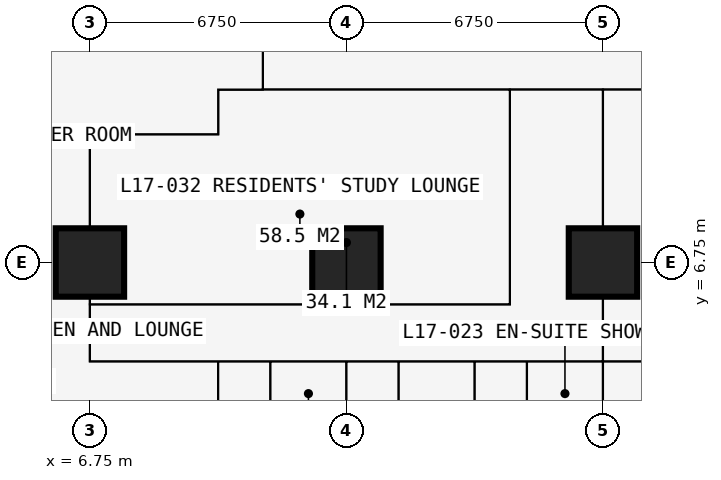
"""IFC4 building model, lengths in metres.
Left out: names, types, materials, properties, quantities, classifications, styles, units other than length and angle.
Written with IfcOpenShell. Run it as: python <this file> out.ifc"""

import sys

from ifc_helpers import new_model, si_unit, direction, frame, frame_2d, origin, origin_2d, place, context, subcontext, project, spatial, rectangle, extrude, element, fill, save


model = new_model("IFC4")
c1 = context("Model", 3, precision=1e-05, world=origin(), true_north=direction((0.0, 1.0)))
c2 = subcontext(c1, "Body", "Model", "MODEL_VIEW")
j1 = project(units=[si_unit("LENGTHUNIT", "METRE"), si_unit("PLANEANGLEUNIT", "RADIAN")], contexts=[c1])
p1 = place(None, origin())
s1 = spatial("IfcSite", under=j1, at=p1, CompositionType="ELEMENT")
p2 = place(p1, origin())
s2 = spatial("IfcBuilding", under=s1, at=p2, CompositionType="ELEMENT")
p3 = place(p2, frame((0.0, 0.0, 64.8)))
s3 = spatial("IfcBuildingStorey", under=s2, at=p3, CompositionType="ELEMENT", Elevation=64.8)
for number, where, z_axis, x_axis in (
    (1, (6.75, 6.75, 0.0), (0.0, 0.0, 1.0), (1.0, 0.0, 0.0)),
    (2, (13.5, 6.75, 0.0), (0.0, 0.0, 1.0), (1.0, 0.0, 0.0)),
    (3, (20.25, 6.75, 0.0), (0.0, 0.0, 1.0), (1.0, 0.0, 0.0)),
):
    element("IfcColumn", number, at=place(p3, frame(where, z_axis=z_axis, x_axis=x_axis)), inside=s3, PredefinedType="COLUMN", context=c2, shape_type="SweptSolid", body=[
        extrude(rectangle(XDim=1.8, YDim=1.8, at=origin_2d()), origin(), (0.0, 0.0, 1.0), 3.6),
    ])
p4 = place(p3, frame((-0.734, 10.125, 0.0), z_axis=(0.0, 0.0, 1.0), x_axis=(1.0, 0.0, 0.0)))
e4 = element("IfcWall", 4, at=p4, inside=s3, PredefinedType="PARTITIONING", context=c2, shape_type="SweptSolid", body=[
    extrude(rectangle(XDim=10.859, YDim=0.15, at=frame_2d((5.429, 0.0))), origin(), (0.0, 0.0, 1.0), 3.375),
])
p5 = place(p3, frame((6.75, 4.15, 0.0), z_axis=(0.0, 0.0, 1.0), x_axis=(0.0, 1.0, 0.0)))
e5 = element("IfcWall", 5, at=p5, inside=s3, PredefinedType="PARTITIONING", context=c2, shape_type="SweptSolid", body=[
    extrude(rectangle(XDim=5.975, YDim=0.15, at=frame_2d((2.988, 0.0))), origin(), (0.0, 0.0, 1.0), 2.877),
])
p6 = place(p3, frame((6.75, 4.15, 0.0), z_axis=(0.0, 0.0, 1.0), x_axis=(1.0, 0.0, 0.0)))
e6 = element("IfcWall", 6, at=p6, inside=s3, PredefinedType="PARTITIONING", context=c2, shape_type="SweptSolid", body=[
    extrude(rectangle(XDim=23.625, YDim=0.1, at=frame_2d((11.812, 0.0))), origin(), (0.0, 0.0, 1.0), 3.375),
])
p7 = place(p6, frame((1.2, 0.0, 0.0)))
e7 = element("IfcOpeningElement", 7, at=p7, cuts=e6, PredefinedType="OPENING", context=c2, shape_type="SweptSolid", body=[
    extrude(rectangle(XDim=1.0, YDim=2.2, at=frame_2d((0.5, 1.1))), frame((0.0, 0.06, 0.0), z_axis=(0.0, -1.0, 0.0), x_axis=(1.0, 0.0, 0.0)), (0.0, 0.0, 1.0), 0.12),
])
p8 = place(p6, frame((3.575, 0.0, 0.0)))
e8 = element("IfcOpeningElement", 8, at=p8, cuts=e6, PredefinedType="OPENING", context=c2, shape_type="SweptSolid", body=[
    extrude(rectangle(XDim=0.95, YDim=2.2, at=frame_2d((0.475, 1.1))), frame((0.0, 0.06, 0.0), z_axis=(0.0, -1.0, 0.0), x_axis=(1.0, 0.0, 0.0)), (0.0, 0.0, 1.0), 0.12),
])
p9 = place(p6, frame((7.0, 0.0, 0.0)))
e9 = element("IfcOpeningElement", 9, at=p9, cuts=e6, PredefinedType="OPENING", context=c2, shape_type="SweptSolid", body=[
    extrude(rectangle(XDim=0.95, YDim=2.2, at=frame_2d((0.475, 1.1))), frame((0.0, 0.06, 0.0), z_axis=(0.0, -1.0, 0.0), x_axis=(1.0, 0.0, 0.0)), (0.0, 0.0, 1.0), 0.12),
])
p10 = place(p6, frame((10.375, 0.0, 0.0)))
e10 = element("IfcOpeningElement", 10, at=p10, cuts=e6, PredefinedType="OPENING", context=c2, shape_type="SweptSolid", body=[
    extrude(rectangle(XDim=0.95, YDim=2.2, at=frame_2d((0.475, 1.1))), frame((0.0, 0.06, 0.0), z_axis=(0.0, -1.0, 0.0), x_axis=(1.0, 0.0, 0.0)), (0.0, 0.0, 1.0), 0.12),
])
p11 = place(p6, frame((13.7, 0.0, 0.0)))
e11 = element("IfcOpeningElement", 11, at=p11, cuts=e6, PredefinedType="OPENING", context=c2, shape_type="SweptSolid", body=[
    extrude(rectangle(XDim=0.95, YDim=2.2, at=frame_2d((0.475, 1.1))), frame((0.0, 0.06, 0.0), z_axis=(0.0, -1.0, 0.0), x_axis=(1.0, 0.0, 0.0)), (0.0, 0.0, 1.0), 0.12),
])
p12 = place(p6, frame((17.125, 0.0, 0.0)))
e12 = element("IfcOpeningElement", 12, at=p12, cuts=e6, PredefinedType="OPENING", context=c2, shape_type="SweptSolid", body=[
    extrude(rectangle(XDim=0.95, YDim=2.2, at=frame_2d((0.475, 1.1))), frame((0.0, 0.06, 0.0), z_axis=(0.0, -1.0, 0.0), x_axis=(1.0, 0.0, 0.0)), (0.0, 0.0, 1.0), 0.12),
])
p13 = place(p6, frame((20.5, 0.0, 0.0)))
e13 = element("IfcOpeningElement", 13, at=p13, cuts=e6, PredefinedType="OPENING", context=c2, shape_type="SweptSolid", body=[
    extrude(rectangle(XDim=0.95, YDim=2.2, at=frame_2d((0.475, 1.1))), frame((0.0, 0.06, 0.0), z_axis=(0.0, -1.0, 0.0), x_axis=(1.0, 0.0, 0.0)), (0.0, 0.0, 1.0), 0.12),
])
p14 = place(p3, frame((6.75, 5.65, 0.0), z_axis=(0.0, 0.0, 1.0), x_axis=(1.0, 0.0, 0.0)))
e14 = element("IfcWall", 14, at=p14, inside=s3, PredefinedType="PARTITIONING", context=c2, shape_type="SweptSolid", body=[
    extrude(rectangle(XDim=11.05, YDim=0.15, at=frame_2d((5.525, 0.0))), origin(), (0.0, 0.0, 1.0), 3.375),
])
p15 = place(p3, frame((10.125, -0.734, 0.0), z_axis=(0.0, 0.0, 1.0), x_axis=(0.0, 1.0, 0.0)))
e15 = element("IfcWall", 15, at=p15, inside=s3, PredefinedType="PARTITIONING", context=c2, shape_type="SweptSolid", body=[
    extrude(rectangle(XDim=4.884, YDim=0.15, at=frame_2d((2.442, 0.0))), origin(), (0.0, 0.0, 1.0), 3.375),
])
p16 = place(p3, frame((10.125, 10.125, 0.0), z_axis=(0.0, 0.0, 1.0), x_axis=(0.0, 1.0, 0.0)))
e16 = element("IfcWall", 16, at=p16, inside=s3, PredefinedType="PARTITIONING", context=c2, shape_type="SweptSolid", body=[
    extrude(rectangle(XDim=1.175, YDim=0.15, at=frame_2d((0.587, 0.0))), origin(), (0.0, 0.0, 1.0), 3.375),
])
p17 = place(p3, frame((10.125, 11.3, 0.0), z_axis=(0.0, 0.0, 1.0), x_axis=(1.0, 0.0, 0.0)))
e17 = element("IfcWall", 17, at=p17, inside=s3, PredefinedType="PARTITIONING", context=c2, shape_type="SweptSolid", body=[
    extrude(rectangle(XDim=20.675, YDim=0.15, at=frame_2d((10.337, 0.0))), origin(), (0.0, 0.0, 1.0), 3.375),
])
p18 = place(p17, frame((8.375, 0.0, 0.0)))
e18 = element("IfcOpeningElement", 18, at=p18, cuts=e17, PredefinedType="OPENING", context=c2, shape_type="SweptSolid", body=[
    extrude(rectangle(XDim=1.0, YDim=2.2, at=frame_2d((0.5, 1.1))), frame((0.0, 0.085, 0.0), z_axis=(0.0, -1.0, 0.0), x_axis=(1.0, 0.0, 0.0)), (0.0, 0.0, 1.0), 0.17),
])
p19 = place(p17, frame((10.975, 0.0, 0.0)))
e19 = element("IfcOpeningElement", 19, at=p19, cuts=e17, PredefinedType="OPENING", context=c2, shape_type="SweptSolid", body=[
    extrude(rectangle(XDim=1.0, YDim=2.2, at=frame_2d((0.5, 1.1))), frame((0.0, 0.085, 0.0), z_axis=(0.0, -1.0, 0.0), x_axis=(1.0, 0.0, 0.0)), (0.0, 0.0, 1.0), 0.17),
])
p20 = place(p17, frame((3.925, 0.0, 0.0)))
e20 = element("IfcOpeningElement", 20, at=p20, cuts=e17, PredefinedType="OPENING", context=c2, shape_type="SweptSolid", body=[
    extrude(rectangle(XDim=0.95, YDim=2.2, at=frame_2d((0.475, 1.1))), frame((0.0, 0.085, 0.0), z_axis=(0.0, -1.0, 0.0), x_axis=(1.0, 0.0, 0.0)), (0.0, 0.0, 1.0), 0.17),
])
p21 = place(p3, frame((11.3, 11.3, 0.0), z_axis=(0.0, 0.0, 1.0), x_axis=(0.0, 1.0, 0.0)))
e21 = element("IfcWall", 21, at=p21, inside=s3, PredefinedType="PARTITIONING", context=c2, shape_type="SweptSolid", body=[
    extrude(rectangle(XDim=19.075, YDim=0.15, at=frame_2d((9.538, 0.0))), origin(), (0.0, 0.0, 1.0), 3.375),
])
p22 = place(p21, frame((10.137, 0.0, 0.0)))
e22 = element("IfcOpeningElement", 22, at=p22, cuts=e21, PredefinedType="OPENING", context=c2, shape_type="SweptSolid", body=[
    extrude(rectangle(XDim=1.0, YDim=2.2, at=frame_2d((0.5, 1.1))), frame((0.0, 0.085, 0.0), z_axis=(0.0, -1.0, 0.0), x_axis=(1.0, 0.0, 0.0)), (0.0, 0.0, 1.0), 0.17),
])
p23 = place(p3, frame((11.5, 1.95, 0.0), z_axis=(0.0, 0.0, 1.0), x_axis=(0.0, 1.0, 0.0)))
e23 = element("IfcWall", 23, at=p23, inside=s3, PredefinedType="PARTITIONING", context=c2, shape_type="SweptSolid", body=[
    extrude(rectangle(XDim=2.2, YDim=0.1, at=frame_2d((1.1, 0.0))), origin(), (0.0, 0.0, 1.0), 3.375),
])
p24 = place(p23, frame((0.65, 0.0, 0.0)))
e24 = element("IfcOpeningElement", 24, at=p24, cuts=e23, PredefinedType="OPENING", context=c2, shape_type="SweptSolid", body=[
    extrude(rectangle(XDim=0.9, YDim=2.2, at=frame_2d((0.45, 1.1))), frame((0.0, 0.06, 0.0), z_axis=(0.0, -1.0, 0.0), x_axis=(1.0, 0.0, 0.0)), (0.0, 0.0, 1.0), 0.12),
])
p25 = place(p3, frame((13.5, -0.734, 0.0), z_axis=(0.0, 0.0, 1.0), x_axis=(0.0, 1.0, 0.0)))
e25 = element("IfcWall", 25, at=p25, inside=s3, PredefinedType="PARTITIONING", context=c2, shape_type="SweptSolid", body=[
    extrude(rectangle(XDim=4.884, YDim=0.175, at=frame_2d((2.442, 0.0))), origin(), (0.0, 0.0, 1.0), 2.61),
])
p26 = place(p3, frame((14.875, 1.95, 0.0), z_axis=(0.0, 0.0, 1.0), x_axis=(0.0, 1.0, 0.0)))
e26 = element("IfcWall", 26, at=p26, inside=s3, PredefinedType="PARTITIONING", context=c2, shape_type="SweptSolid", body=[
    extrude(rectangle(XDim=2.2, YDim=0.1, at=frame_2d((1.1, 0.0))), origin(), (0.0, 0.0, 1.0), 3.375),
])
p27 = place(p26, frame((0.65, 0.0, 0.0)))
e27 = element("IfcOpeningElement", 27, at=p27, cuts=e26, PredefinedType="OPENING", context=c2, shape_type="SweptSolid", body=[
    extrude(rectangle(XDim=0.9, YDim=2.2, at=frame_2d((0.45, 1.1))), frame((0.0, 0.06, 0.0), z_axis=(0.0, -1.0, 0.0), x_axis=(1.0, 0.0, 0.0)), (0.0, 0.0, 1.0), 0.12),
])
p28 = place(p3, frame((16.875, -0.734, 0.0), z_axis=(0.0, 0.0, 1.0), x_axis=(0.0, 1.0, 0.0)))
e28 = element("IfcWall", 28, at=p28, inside=s3, PredefinedType="PARTITIONING", context=c2, shape_type="SweptSolid", body=[
    extrude(rectangle(XDim=4.884, YDim=0.175, at=frame_2d((2.442, 0.0))), origin(), (0.0, 0.0, 1.0), 3.375),
])
p29 = place(p3, frame((17.8, 5.65, 0.0), z_axis=(0.0, 0.0, 1.0), x_axis=(0.0, 1.0, 0.0)))
e29 = element("IfcWall", 29, at=p29, inside=s3, PredefinedType="PARTITIONING", context=c2, shape_type="SweptSolid", body=[
    extrude(rectangle(XDim=5.65, YDim=0.15, at=frame_2d((2.825, 0.0))), origin(), (0.0, 0.0, 1.0), 3.375),
])
p30 = place(p3, frame((18.25, 1.95, 0.0), z_axis=(0.0, 0.0, 1.0), x_axis=(0.0, 1.0, 0.0)))
e30 = element("IfcWall", 30, at=p30, inside=s3, PredefinedType="PARTITIONING", context=c2, shape_type="SweptSolid", body=[
    extrude(rectangle(XDim=2.2, YDim=0.1, at=frame_2d((1.1, 0.0))), origin(), (0.0, 0.0, 1.0), 3.375),
])
p31 = place(p30, frame((0.65, 0.0, 0.0)))
e31 = element("IfcOpeningElement", 31, at=p31, cuts=e30, PredefinedType="OPENING", context=c2, shape_type="SweptSolid", body=[
    extrude(rectangle(XDim=0.9, YDim=2.2, at=frame_2d((0.45, 1.1))), frame((0.0, 0.06, 0.0), z_axis=(0.0, -1.0, 0.0), x_axis=(1.0, 0.0, 0.0)), (0.0, 0.0, 1.0), 0.12),
])
p32 = place(p3, frame((20.25, -0.734, 0.0), z_axis=(0.0, 0.0, 1.0), x_axis=(0.0, 1.0, 0.0)))
e32 = element("IfcWall", 32, at=p32, inside=s3, PredefinedType="PARTITIONING", context=c2, shape_type="SweptSolid", body=[
    extrude(rectangle(XDim=12.034, YDim=0.15, at=frame_2d((6.017, 0.0))), origin(), (0.0, 0.0, 1.0), 2.61),
])
p33 = place(p7, origin())
e33 = element("IfcDoor", 33, at=p33, inside=s3, OperationType="SINGLE_SWING_LEFT", PredefinedType="DOOR", context=c2, shape_type="SweptSolid", body=[
    extrude(rectangle(XDim=1.0, YDim=2.2, at=frame_2d((0.5, 1.1))), frame((0.0, 0.025, 0.0), z_axis=(0.0, -1.0, 0.0), x_axis=(1.0, 0.0, 0.0)), (0.0, 0.0, 1.0), 0.05),
])
fill(e7, e33)
p34 = place(p8, origin())
e34 = element("IfcDoor", 34, at=p34, inside=s3, OperationType="SINGLE_SWING_LEFT", PredefinedType="DOOR", context=c2, shape_type="SweptSolid", body=[
    extrude(rectangle(XDim=0.95, YDim=2.2, at=frame_2d((0.475, 1.1))), frame((0.0, 0.025, 0.0), z_axis=(0.0, -1.0, 0.0), x_axis=(1.0, 0.0, 0.0)), (0.0, 0.0, 1.0), 0.05),
])
fill(e8, e34)
p35 = place(p24, origin())
e35 = element("IfcDoor", 35, at=p35, inside=s3, OperationType="SINGLE_SWING_RIGHT", PredefinedType="DOOR", context=c2, shape_type="SweptSolid", body=[
    extrude(rectangle(XDim=0.9, YDim=2.2, at=frame_2d((0.45, 1.1))), frame((0.0, 0.025, 0.0), z_axis=(0.0, -1.0, 0.0), x_axis=(1.0, 0.0, 0.0)), (0.0, 0.0, 1.0), 0.05),
])
fill(e24, e35)
p36 = place(p9, origin())
e36 = element("IfcDoor", 36, at=p36, inside=s3, OperationType="SINGLE_SWING_LEFT", PredefinedType="DOOR", context=c2, shape_type="SweptSolid", body=[
    extrude(rectangle(XDim=0.95, YDim=2.2, at=frame_2d((0.475, 1.1))), frame((0.0, 0.025, 0.0), z_axis=(0.0, -1.0, 0.0), x_axis=(1.0, 0.0, 0.0)), (0.0, 0.0, 1.0), 0.05),
])
fill(e9, e36)
p37 = place(p27, origin())
e37 = element("IfcDoor", 37, at=p37, inside=s3, OperationType="SINGLE_SWING_RIGHT", PredefinedType="DOOR", context=c2, shape_type="SweptSolid", body=[
    extrude(rectangle(XDim=0.9, YDim=2.2, at=frame_2d((0.45, 1.1))), frame((0.0, 0.025, 0.0), z_axis=(0.0, -1.0, 0.0), x_axis=(1.0, 0.0, 0.0)), (0.0, 0.0, 1.0), 0.05),
])
fill(e27, e37)
p38 = place(p10, origin())
e38 = element("IfcDoor", 38, at=p38, inside=s3, OperationType="SINGLE_SWING_LEFT", PredefinedType="DOOR", context=c2, shape_type="SweptSolid", body=[
    extrude(rectangle(XDim=0.95, YDim=2.2, at=frame_2d((0.475, 1.1))), frame((0.0, 0.025, 0.0), z_axis=(0.0, -1.0, 0.0), x_axis=(1.0, 0.0, 0.0)), (0.0, 0.0, 1.0), 0.05),
])
fill(e10, e38)
p39 = place(p31, origin())
e39 = element("IfcDoor", 39, at=p39, inside=s3, OperationType="SINGLE_SWING_RIGHT", PredefinedType="DOOR", context=c2, shape_type="SweptSolid", body=[
    extrude(rectangle(XDim=0.9, YDim=2.2, at=frame_2d((0.45, 1.1))), frame((0.0, 0.025, 0.0), z_axis=(0.0, -1.0, 0.0), x_axis=(1.0, 0.0, 0.0)), (0.0, 0.0, 1.0), 0.05),
])
fill(e31, e39)
p40 = place(p18, origin())
e40 = element("IfcDoor", 40, at=p40, inside=s3, OperationType="SINGLE_SWING_LEFT", PredefinedType="DOOR", context=c2, shape_type="SweptSolid", body=[
    extrude(rectangle(XDim=1.0, YDim=2.2, at=frame_2d((0.5, 1.1))), frame((0.0, 0.025, 0.0), z_axis=(0.0, -1.0, 0.0), x_axis=(1.0, 0.0, 0.0)), (0.0, 0.0, 1.0), 0.05),
])
fill(e18, e40)
p41 = place(p11, origin())
e41 = element("IfcDoor", 41, at=p41, inside=s3, OperationType="SINGLE_SWING_LEFT", PredefinedType="DOOR", context=c2, shape_type="SweptSolid", body=[
    extrude(rectangle(XDim=0.95, YDim=2.2, at=frame_2d((0.475, 1.1))), frame((0.0, 0.025, 0.0), z_axis=(0.0, -1.0, 0.0), x_axis=(1.0, 0.0, 0.0)), (0.0, 0.0, 1.0), 0.05),
])
fill(e11, e41)
p42 = place(p19, origin())
e42 = element("IfcDoor", 42, at=p42, inside=s3, OperationType="SINGLE_SWING_LEFT", PredefinedType="DOOR", context=c2, shape_type="SweptSolid", body=[
    extrude(rectangle(XDim=1.0, YDim=2.2, at=frame_2d((0.5, 1.1))), frame((0.0, 0.025, 0.0), z_axis=(0.0, -1.0, 0.0), x_axis=(1.0, 0.0, 0.0)), (0.0, 0.0, 1.0), 0.05),
])
fill(e19, e42)
p43 = place(p20, origin())
e43 = element("IfcDoor", 43, at=p43, inside=s3, OperationType="SINGLE_SWING_LEFT", PredefinedType="DOOR", context=c2, shape_type="SweptSolid", body=[
    extrude(rectangle(XDim=0.95, YDim=2.2, at=frame_2d((0.475, 1.1))), frame((0.0, 0.025, 0.0), z_axis=(0.0, -1.0, 0.0), x_axis=(1.0, 0.0, 0.0)), (0.0, 0.0, 1.0), 0.05),
])
fill(e20, e43)
save(model, sys.argv[1])
